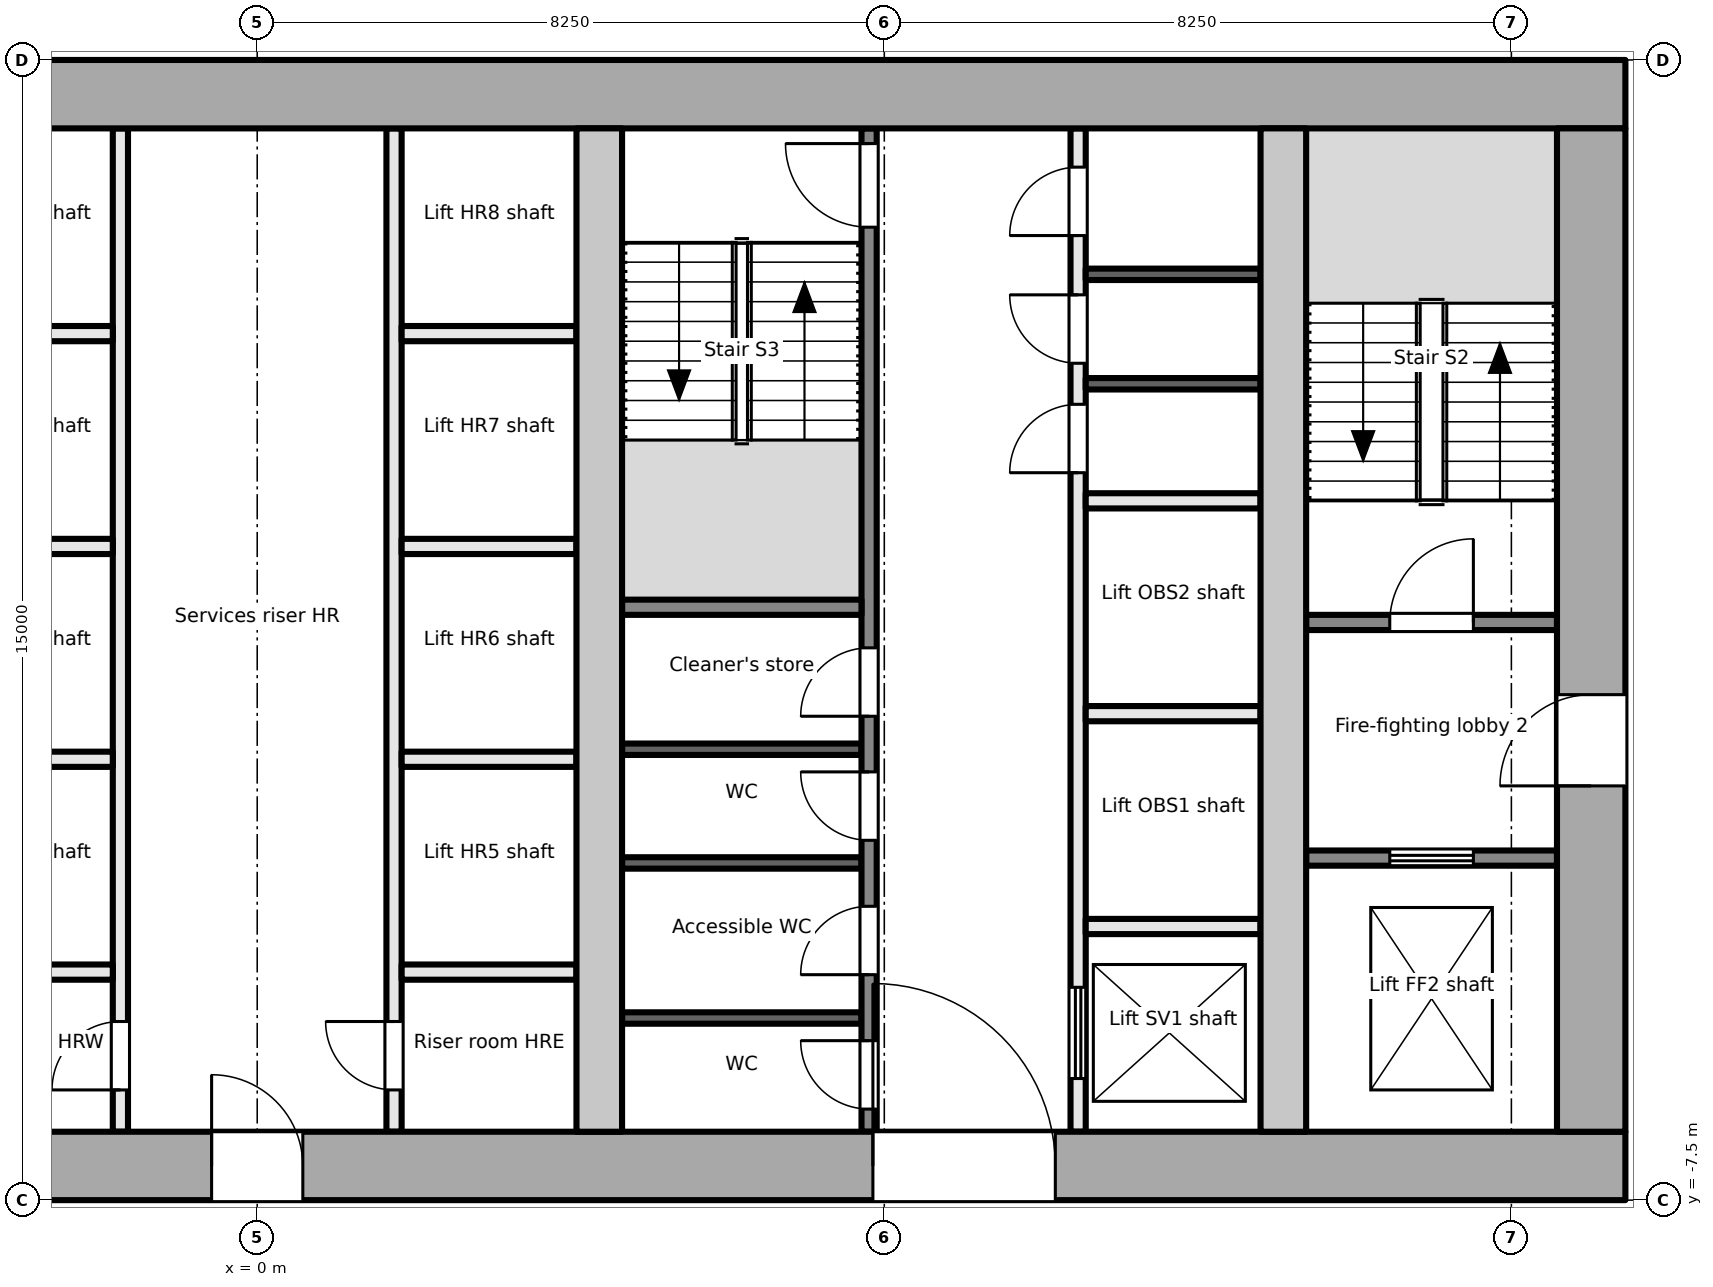
"""IFC4 building model, lengths in metres.
Left out: names, types, materials, properties, quantities, classifications, styles, units other than length and angle.
Written with IfcOpenShell. Run it as: python <this file> out.ifc"""

import sys

from ifc_helpers import new_model, si_unit, direction, frame, frame_2d, origin, place, context, subcontext, project, spatial, rectangle, extrude, element, fill, save


model = new_model("IFC4")
c1 = context("Model", 3, precision=1e-05, world=origin(), true_north=direction((0.0, 1.0)))
c2 = subcontext(c1, "Body", "Model", "MODEL_VIEW")
j1 = project(units=[si_unit("LENGTHUNIT", "METRE"), si_unit("PLANEANGLEUNIT", "RADIAN")], contexts=[c1])
p1 = place(None, origin())
s1 = spatial("IfcSite", under=j1, at=p1, CompositionType="ELEMENT")
p2 = place(p1, origin())
s2 = spatial("IfcBuilding", under=s1, at=p2, CompositionType="ELEMENT")
p3 = place(p2, frame((0.0, 0.0, 95.7)))
s3 = spatial("IfcBuildingStorey", under=s2, at=p3, CompositionType="ELEMENT", Elevation=95.7)
p4 = place(p3, frame((-18.0, -7.05, -0.2), z_axis=(0.0, 0.0, 1.0), x_axis=(1.0, 0.0, 0.0)))
e1 = element("IfcWall", 1, at=p4, inside=s3, PredefinedType="SHEAR", context=c2, shape_type="SweptSolid", body=[
    extrude(rectangle(XDim=36.0, YDim=0.9, at=frame_2d((18.0, 0.0))), origin(), (0.0, 0.0, 1.0), 4.0),
])
p5 = place(p4, frame((7.8, 0.0, 0.2)))
e2 = element("IfcOpeningElement", 2, at=p5, cuts=e1, PredefinedType="OPENING", context=c2, shape_type="SweptSolid", body=[
    extrude(rectangle(XDim=2.4, YDim=2.1, at=frame_2d((1.2, 1.05))), frame((0.0, 0.46, 0.0), z_axis=(0.0, -1.0, 0.0), x_axis=(1.0, 0.0, 0.0)), (0.0, 0.0, 1.0), 0.921),
])
p6 = place(p4, frame((17.4, 0.0, 0.2)))
e3 = element("IfcOpeningElement", 3, at=p6, cuts=e1, PredefinedType="OPENING", context=c2, shape_type="SweptSolid", body=[
    extrude(rectangle(XDim=1.2, YDim=2.1, at=frame_2d((0.6, 1.05))), frame((0.0, 0.46, 0.0), z_axis=(0.0, -1.0, 0.0), x_axis=(1.0, 0.0, 0.0)), (0.0, 0.0, 1.0), 0.921),
])
p7 = place(p4, frame((26.1, 0.0, 0.2)))
e4 = element("IfcOpeningElement", 4, at=p7, cuts=e1, PredefinedType="OPENING", context=c2, shape_type="SweptSolid", body=[
    extrude(rectangle(XDim=2.4, YDim=2.1, at=frame_2d((1.2, 1.05))), frame((0.0, 0.46, 0.0), z_axis=(0.0, -1.0, 0.0), x_axis=(1.0, 0.0, 0.0)), (0.0, 0.0, 1.0), 0.921),
])
p8 = place(p3, frame((-18.0, 7.05, -0.2), z_axis=(0.0, 0.0, 1.0), x_axis=(1.0, 0.0, 0.0)))
e5 = element("IfcWall", 5, at=p8, inside=s3, PredefinedType="SHEAR", context=c2, shape_type="SweptSolid", body=[
    extrude(rectangle(XDim=36.0, YDim=0.9, at=frame_2d((18.0, 0.0))), origin(), (0.0, 0.0, 1.0), 4.0),
])
p9 = place(p3, frame((17.55, -6.6, -0.2), z_axis=(0.0, 0.0, 1.0), x_axis=(0.0, 1.0, 0.0)))
e6 = element("IfcWall", 6, at=p9, inside=s3, PredefinedType="SHEAR", context=c2, shape_type="SweptSolid", body=[
    extrude(rectangle(XDim=13.2, YDim=0.9, at=frame_2d((6.6, 0.0))), origin(), (0.0, 0.0, 1.0), 4.0),
])
p10 = place(p9, frame((4.55, 0.0, 0.2)))
e7 = element("IfcOpeningElement", 7, at=p10, cuts=e6, PredefinedType="OPENING", context=c2, shape_type="SweptSolid", body=[
    extrude(rectangle(XDim=1.2, YDim=2.1, at=frame_2d((0.6, 1.05))), frame((0.0, 0.46, 0.0), z_axis=(0.0, -1.0, 0.0), x_axis=(1.0, 0.0, 0.0)), (0.0, 0.0, 1.0), 0.921),
])
for number, where, z_axis, x_axis in (
    (8, (4.5, -6.6, -0.2), (0.0, 0.0, 1.0), (0.0, 1.0, 0.0)),
    (9, (13.5, -6.6, -0.2), (0.0, 0.0, 1.0), (0.0, 1.0, 0.0)),
):
    element("IfcWall", number, at=place(p3, frame(where, z_axis=z_axis, x_axis=x_axis)), inside=s3, PredefinedType="SHEAR", context=c2, shape_type="SweptSolid", body=[
        extrude(rectangle(XDim=13.2, YDim=0.6, at=frame_2d((6.6, 0.0))), origin(), (0.0, 0.0, 1.0), 4.0),
    ])
p11 = place(p3, frame((13.8, -3.0, 0.0), z_axis=(0.0, 0.0, 1.0), x_axis=(1.0, 0.0, 0.0)))
e10 = element("IfcWall", 10, at=p11, inside=s3, PredefinedType="PARTITIONING", context=c2, shape_type="SweptSolid", body=[
    extrude(rectangle(XDim=3.3, YDim=0.2, at=frame_2d((1.65, 0.0))), origin(), (0.0, 0.0, 1.0), 3.8),
])
p12 = place(p11, frame((1.1, 0.0, 0.0)))
e11 = element("IfcOpeningElement", 11, at=p12, cuts=e10, PredefinedType="OPENING", context=c2, shape_type="SweptSolid", body=[
    extrude(rectangle(XDim=1.1, YDim=2.1, at=frame_2d((0.55, 1.05))), frame((0.0, 0.111, 0.0), z_axis=(0.0, -1.0, 0.0), x_axis=(1.0, 0.0, 0.0)), (0.0, 0.0, 1.0), 0.221),
])
p13 = place(p3, frame((13.8, 0.1, 0.0), z_axis=(0.0, 0.0, 1.0), x_axis=(1.0, 0.0, 0.0)))
e12 = element("IfcWall", 12, at=p13, inside=s3, PredefinedType="PARTITIONING", context=c2, shape_type="SweptSolid", body=[
    extrude(rectangle(XDim=3.3, YDim=0.2, at=frame_2d((1.65, 0.0))), origin(), (0.0, 0.0, 1.0), 3.8),
])
p14 = place(p13, frame((1.1, 0.0, 0.0)))
e13 = element("IfcOpeningElement", 13, at=p14, cuts=e12, PredefinedType="OPENING", context=c2, shape_type="SweptSolid", body=[
    extrude(rectangle(XDim=1.1, YDim=2.1, at=frame_2d((0.55, 1.05))), frame((0.0, 0.111, 0.0), z_axis=(0.0, -1.0, 0.0), x_axis=(1.0, 0.0, 0.0)), (0.0, 0.0, 1.0), 0.221),
])
p15 = place(p3, frame((-1.8, -6.6, 0.0), z_axis=(0.0, 0.0, 1.0), x_axis=(0.0, 1.0, 0.0)))
e14 = element("IfcWall", 14, at=p15, inside=s3, PredefinedType="PARTITIONING", context=c2, shape_type="SweptSolid", body=[
    extrude(rectangle(XDim=13.2, YDim=0.2, at=frame_2d((6.6, 0.0))), origin(), (0.0, 0.0, 1.0), 3.8),
])
p16 = place(p15, frame((0.55, 0.0, 0.0)))
e15 = element("IfcOpeningElement", 15, at=p16, cuts=e14, PredefinedType="OPENING", context=c2, shape_type="SweptSolid", body=[
    extrude(rectangle(XDim=0.9, YDim=2.1, at=frame_2d((0.45, 1.05))), frame((0.0, 0.111, 0.0), z_axis=(0.0, -1.0, 0.0), x_axis=(1.0, 0.0, 0.0)), (0.0, 0.0, 1.0), 0.221),
])
p17 = place(p3, frame((1.8, -6.6, 0.0), z_axis=(0.0, 0.0, 1.0), x_axis=(0.0, 1.0, 0.0)))
e16 = element("IfcWall", 16, at=p17, inside=s3, PredefinedType="PARTITIONING", context=c2, shape_type="SweptSolid", body=[
    extrude(rectangle(XDim=13.2, YDim=0.2, at=frame_2d((6.6, 0.0))), origin(), (0.0, 0.0, 1.0), 3.8),
])
p18 = place(p17, frame((0.55, 0.0, 0.0)))
e17 = element("IfcOpeningElement", 17, at=p18, cuts=e16, PredefinedType="OPENING", context=c2, shape_type="SweptSolid", body=[
    extrude(rectangle(XDim=0.9, YDim=2.1, at=frame_2d((0.45, 1.05))), frame((0.0, 0.111, 0.0), z_axis=(0.0, -1.0, 0.0), x_axis=(1.0, 0.0, 0.0)), (0.0, 0.0, 1.0), 0.221),
])
for number, where, z_axis, x_axis in (
    (18, (-4.2, -1.7, 0.0), (0.0, 0.0, 1.0), (1.0, 0.0, 0.0)),
    (19, (-4.2, 1.1, 0.0), (0.0, 0.0, 1.0), (1.0, 0.0, 0.0)),
    (20, (-4.2, 3.9, 0.0), (0.0, 0.0, 1.0), (1.0, 0.0, 0.0)),
    (21, (-4.2, -4.5, 0.0), (0.0, 0.0, 1.0), (1.0, 0.0, 0.0)),
    (22, (1.9, -1.7, 0.0), (0.0, 0.0, 1.0), (1.0, 0.0, 0.0)),
    (23, (1.9, 1.1, 0.0), (0.0, 0.0, 1.0), (1.0, 0.0, 0.0)),
    (24, (1.9, 3.9, 0.0), (0.0, 0.0, 1.0), (1.0, 0.0, 0.0)),
    (25, (1.9, -4.5, 0.0), (0.0, 0.0, 1.0), (1.0, 0.0, 0.0)),
):
    element("IfcWall", number, at=place(p3, frame(where, z_axis=z_axis, x_axis=x_axis)), inside=s3, PredefinedType="PARTITIONING", context=c2, shape_type="SweptSolid", body=[
        extrude(rectangle(XDim=2.3, YDim=0.2, at=frame_2d((1.15, 0.0))), origin(), (0.0, 0.0, 1.0), 3.8),
    ])
p19 = place(p3, frame((8.05, -6.6, 0.0), z_axis=(0.0, 0.0, 1.0), x_axis=(0.0, 1.0, 0.0)))
e26 = element("IfcWall", 26, at=p19, inside=s3, PredefinedType="PARTITIONING", context=c2, shape_type="SweptSolid", body=[
    extrude(rectangle(XDim=13.2, YDim=0.2, at=frame_2d((6.6, 0.0))), origin(), (0.0, 0.0, 1.0), 3.8),
])
p20 = place(p19, frame((0.298, 0.0, 0.0)))
e27 = element("IfcOpeningElement", 27, at=p20, cuts=e26, PredefinedType="OPENING", context=c2, shape_type="SweptSolid", body=[
    extrude(rectangle(XDim=0.9, YDim=2.1, at=frame_2d((0.45, 1.05))), frame((0.0, 0.111, 0.0), z_axis=(0.0, -1.0, 0.0), x_axis=(1.0, 0.0, 0.0)), (0.0, 0.0, 1.0), 0.221),
])
p21 = place(p19, frame((2.066, 0.0, 0.0)))
e28 = element("IfcOpeningElement", 28, at=p21, cuts=e26, PredefinedType="OPENING", context=c2, shape_type="SweptSolid", body=[
    extrude(rectangle(XDim=0.9, YDim=2.1, at=frame_2d((0.45, 1.05))), frame((0.0, 0.111, 0.0), z_axis=(0.0, -1.0, 0.0), x_axis=(1.0, 0.0, 0.0)), (0.0, 0.0, 1.0), 0.221),
])
p22 = place(p19, frame((3.834, 0.0, 0.0)))
e29 = element("IfcOpeningElement", 29, at=p22, cuts=e26, PredefinedType="OPENING", context=c2, shape_type="SweptSolid", body=[
    extrude(rectangle(XDim=0.9, YDim=2.1, at=frame_2d((0.45, 1.05))), frame((0.0, 0.111, 0.0), z_axis=(0.0, -1.0, 0.0), x_axis=(1.0, 0.0, 0.0)), (0.0, 0.0, 1.0), 0.221),
])
p23 = place(p19, frame((5.466, 0.0, 0.0)))
e30 = element("IfcOpeningElement", 30, at=p23, cuts=e26, PredefinedType="OPENING", context=c2, shape_type="SweptSolid", body=[
    extrude(rectangle(XDim=0.9, YDim=2.1, at=frame_2d((0.45, 1.05))), frame((0.0, 0.111, 0.0), z_axis=(0.0, -1.0, 0.0), x_axis=(1.0, 0.0, 0.0)), (0.0, 0.0, 1.0), 0.221),
])
p24 = place(p19, frame((11.9, 0.0, 0.0)))
e31 = element("IfcOpeningElement", 31, at=p24, cuts=e26, PredefinedType="OPENING", context=c2, shape_type="SweptSolid", body=[
    extrude(rectangle(XDim=1.1, YDim=2.1, at=frame_2d((0.55, 1.05))), frame((0.0, 0.111, 0.0), z_axis=(0.0, -1.0, 0.0), x_axis=(1.0, 0.0, 0.0)), (0.0, 0.0, 1.0), 0.221),
])
p25 = place(p3, frame((10.8, -6.6, 0.0), z_axis=(0.0, 0.0, 1.0), x_axis=(0.0, 1.0, 0.0)))
e32 = element("IfcWall", 32, at=p25, inside=s3, PredefinedType="PARTITIONING", context=c2, shape_type="SweptSolid", body=[
    extrude(rectangle(XDim=13.2, YDim=0.2, at=frame_2d((6.6, 0.0))), origin(), (0.0, 0.0, 1.0), 3.8),
])
p26 = place(p25, frame((0.7, 0.0, 0.0)))
e33 = element("IfcOpeningElement", 33, at=p26, cuts=e32, PredefinedType="OPENING", context=c2, shape_type="SweptSolid", body=[
    extrude(rectangle(XDim=1.2, YDim=2.1, at=frame_2d((0.6, 1.05))), frame((0.0, 0.111, 0.0), z_axis=(0.0, -1.0, 0.0), x_axis=(1.0, 0.0, 0.0)), (0.0, 0.0, 1.0), 0.221),
])
p27 = place(p25, frame((8.67, 0.0, 0.0)))
e34 = element("IfcOpeningElement", 34, at=p27, cuts=e32, PredefinedType="OPENING", context=c2, shape_type="SweptSolid", body=[
    extrude(rectangle(XDim=0.9, YDim=2.1, at=frame_2d((0.45, 1.05))), frame((0.0, 0.111, 0.0), z_axis=(0.0, -1.0, 0.0), x_axis=(1.0, 0.0, 0.0)), (0.0, 0.0, 1.0), 0.221),
])
p28 = place(p25, frame((10.11, 0.0, 0.0)))
e35 = element("IfcOpeningElement", 35, at=p28, cuts=e32, PredefinedType="OPENING", context=c2, shape_type="SweptSolid", body=[
    extrude(rectangle(XDim=0.9, YDim=2.1, at=frame_2d((0.45, 1.05))), frame((0.0, 0.111, 0.0), z_axis=(0.0, -1.0, 0.0), x_axis=(1.0, 0.0, 0.0)), (0.0, 0.0, 1.0), 0.221),
])
p29 = place(p25, frame((11.79, 0.0, 0.0)))
e36 = element("IfcOpeningElement", 36, at=p29, cuts=e32, PredefinedType="OPENING", context=c2, shape_type="SweptSolid", body=[
    extrude(rectangle(XDim=0.9, YDim=2.1, at=frame_2d((0.45, 1.05))), frame((0.0, 0.111, 0.0), z_axis=(0.0, -1.0, 0.0), x_axis=(1.0, 0.0, 0.0)), (0.0, 0.0, 1.0), 0.221),
])
p30 = place(p3, frame((4.8, 0.3, 0.0), z_axis=(0.0, 0.0, 1.0), x_axis=(1.0, 0.0, 0.0)))
e37 = element("IfcWall", 37, at=p30, inside=s3, PredefinedType="PARTITIONING", context=c2, shape_type="SweptSolid", body=[
    extrude(rectangle(XDim=3.15, YDim=0.2, at=frame_2d((1.575, 0.0))), origin(), (0.0, 0.0, 1.0), 3.8),
])
for number, where, z_axis, x_axis in (
    (38, (4.8, -5.104, 0.0), (0.0, 0.0, 1.0), (1.0, 0.0, 0.0)),
    (39, (4.8, -3.064, 0.0), (0.0, 0.0, 1.0), (1.0, 0.0, 0.0)),
    (40, (4.8, -1.568, 0.0), (0.0, 0.0, 1.0), (1.0, 0.0, 0.0)),
):
    element("IfcWall", number, at=place(p3, frame(where, z_axis=z_axis, x_axis=x_axis)), inside=s3, PredefinedType="PARTITIONING", context=c2, shape_type="SweptSolid", body=[
        extrude(rectangle(XDim=3.15, YDim=0.15, at=frame_2d((1.575, 0.0))), origin(), (0.0, 0.0, 1.0), 3.8),
    ])
for number, where, z_axis, x_axis in (
    (41, (10.9, -3.9, 0.0), (0.0, 0.0, 1.0), (1.0, 0.0, 0.0)),
    (42, (10.9, -1.1, 0.0), (0.0, 0.0, 1.0), (1.0, 0.0, 0.0)),
    (43, (10.9, 1.7, 0.0), (0.0, 0.0, 1.0), (1.0, 0.0, 0.0)),
):
    element("IfcWall", number, at=place(p3, frame(where, z_axis=z_axis, x_axis=x_axis)), inside=s3, PredefinedType="PARTITIONING", context=c2, shape_type="SweptSolid", body=[
        extrude(rectangle(XDim=2.3, YDim=0.2, at=frame_2d((1.15, 0.0))), origin(), (0.0, 0.0, 1.0), 3.8),
    ])
for number, where, z_axis, x_axis in (
    (44, (10.9, 3.24, 0.0), (0.0, 0.0, 1.0), (1.0, 0.0, 0.0)),
    (45, (10.9, 4.68, 0.0), (0.0, 0.0, 1.0), (1.0, 0.0, 0.0)),
):
    element("IfcWall", number, at=place(p3, frame(where, z_axis=z_axis, x_axis=x_axis)), inside=s3, PredefinedType="PARTITIONING", context=c2, shape_type="SweptSolid", body=[
        extrude(rectangle(XDim=2.3, YDim=0.15, at=frame_2d((1.15, 0.0))), origin(), (0.0, 0.0, 1.0), 3.8),
    ])
p31 = place(p12, origin())
e46 = element("IfcDoor", 46, at=p31, inside=s3, OperationType="DOUBLE_DOOR_SLIDING", PredefinedType="DOOR", context=c2, shape_type="SweptSolid", body=[
    extrude(rectangle(XDim=1.1, YDim=2.1, at=frame_2d((0.55, 1.05))), frame((0.0, 0.025, 0.0), z_axis=(0.0, -1.0, 0.0), x_axis=(1.0, 0.0, 0.0)), (0.0, 0.0, 1.0), 0.05),
])
fill(e11, e46)
p32 = place(p10, origin())
e47 = element("IfcDoor", 47, at=p32, inside=s3, OperationType="SINGLE_SWING_LEFT", PredefinedType="DOOR", context=c2, shape_type="SweptSolid", body=[
    extrude(rectangle(XDim=1.2, YDim=2.1, at=frame_2d((0.6, 1.05))), frame((0.0, 0.025, 0.0), z_axis=(0.0, -1.0, 0.0), x_axis=(1.0, 0.0, 0.0)), (0.0, 0.0, 1.0), 0.05),
])
fill(e7, e47)
p33 = place(p14, origin())
e48 = element("IfcDoor", 48, at=p33, inside=s3, OperationType="SINGLE_SWING_RIGHT", PredefinedType="DOOR", context=c2, shape_type="SweptSolid", body=[
    extrude(rectangle(XDim=1.1, YDim=2.1, at=frame_2d((0.55, 1.05))), frame((0.0, 0.025, 0.0), z_axis=(0.0, -1.0, 0.0), x_axis=(1.0, 0.0, 0.0)), (0.0, 0.0, 1.0), 0.05),
])
fill(e13, e48)
p34 = place(p16, origin())
e49 = element("IfcDoor", 49, at=p34, inside=s3, OperationType="SINGLE_SWING_LEFT", PredefinedType="DOOR", context=c2, shape_type="SweptSolid", body=[
    extrude(rectangle(XDim=0.9, YDim=2.1, at=frame_2d((0.45, 1.05))), frame((0.0, 0.025, 0.0), z_axis=(0.0, -1.0, 0.0), x_axis=(1.0, 0.0, 0.0)), (0.0, 0.0, 1.0), 0.05),
])
fill(e15, e49)
p35 = place(p18, origin())
e50 = element("IfcDoor", 50, at=p35, inside=s3, OperationType="SINGLE_SWING_RIGHT", PredefinedType="DOOR", context=c2, shape_type="SweptSolid", body=[
    extrude(rectangle(XDim=0.9, YDim=2.1, at=frame_2d((0.45, 1.05))), frame((0.0, 0.025, 0.0), z_axis=(0.0, -1.0, 0.0), x_axis=(1.0, 0.0, 0.0)), (0.0, 0.0, 1.0), 0.05),
])
fill(e17, e50)
p36 = place(p6, origin())
e51 = element("IfcDoor", 51, at=p36, inside=s3, OperationType="SINGLE_SWING_LEFT", PredefinedType="DOOR", context=c2, shape_type="SweptSolid", body=[
    extrude(rectangle(XDim=1.2, YDim=2.1, at=frame_2d((0.6, 1.05))), frame((0.0, 0.025, 0.0), z_axis=(0.0, -1.0, 0.0), x_axis=(1.0, 0.0, 0.0)), (0.0, 0.0, 1.0), 0.05),
])
fill(e3, e51)
p37 = place(p20, origin())
e52 = element("IfcDoor", 52, at=p37, inside=s3, OperationType="SINGLE_SWING_RIGHT", PredefinedType="DOOR", context=c2, shape_type="SweptSolid", body=[
    extrude(rectangle(XDim=0.9, YDim=2.1, at=frame_2d((0.45, 1.05))), frame((0.0, 0.025, 0.0), z_axis=(0.0, -1.0, 0.0), x_axis=(1.0, 0.0, 0.0)), (0.0, 0.0, 1.0), 0.05),
])
fill(e27, e52)
p38 = place(p21, origin())
e53 = element("IfcDoor", 53, at=p38, inside=s3, OperationType="SINGLE_SWING_LEFT", PredefinedType="DOOR", context=c2, shape_type="SweptSolid", body=[
    extrude(rectangle(XDim=0.9, YDim=2.1, at=frame_2d((0.45, 1.05))), frame((0.0, 0.025, 0.0), z_axis=(0.0, -1.0, 0.0), x_axis=(1.0, 0.0, 0.0)), (0.0, 0.0, 1.0), 0.05),
])
fill(e28, e53)
p39 = place(p22, origin())
e54 = element("IfcDoor", 54, at=p39, inside=s3, OperationType="SINGLE_SWING_RIGHT", PredefinedType="DOOR", context=c2, shape_type="SweptSolid", body=[
    extrude(rectangle(XDim=0.9, YDim=2.1, at=frame_2d((0.45, 1.05))), frame((0.0, 0.025, 0.0), z_axis=(0.0, -1.0, 0.0), x_axis=(1.0, 0.0, 0.0)), (0.0, 0.0, 1.0), 0.05),
])
fill(e29, e54)
p40 = place(p23, origin())
e55 = element("IfcDoor", 55, at=p40, inside=s3, OperationType="SINGLE_SWING_LEFT", PredefinedType="DOOR", context=c2, shape_type="SweptSolid", body=[
    extrude(rectangle(XDim=0.9, YDim=2.1, at=frame_2d((0.45, 1.05))), frame((0.0, 0.025, 0.0), z_axis=(0.0, -1.0, 0.0), x_axis=(1.0, 0.0, 0.0)), (0.0, 0.0, 1.0), 0.05),
])
fill(e30, e55)
p41 = place(p24, origin())
e56 = element("IfcDoor", 56, at=p41, inside=s3, OperationType="SINGLE_SWING_RIGHT", PredefinedType="DOOR", context=c2, shape_type="SweptSolid", body=[
    extrude(rectangle(XDim=1.1, YDim=2.1, at=frame_2d((0.55, 1.05))), frame((0.0, 0.025, 0.0), z_axis=(0.0, -1.0, 0.0), x_axis=(1.0, 0.0, 0.0)), (0.0, 0.0, 1.0), 0.05),
])
fill(e31, e56)
p42 = place(p7, origin())
e57 = element("IfcDoor", 57, at=p42, inside=s3, OperationType="DOUBLE_DOOR_DOUBLE_SWING", PredefinedType="DOOR", context=c2, shape_type="SweptSolid", body=[
    extrude(rectangle(XDim=2.4, YDim=2.1, at=frame_2d((1.2, 1.05))), frame((0.0, 0.025, 0.0), z_axis=(0.0, -1.0, 0.0), x_axis=(1.0, 0.0, 0.0)), (0.0, 0.0, 1.0), 0.05),
])
fill(e4, e57)
p43 = place(p26, origin())
e58 = element("IfcDoor", 58, at=p43, inside=s3, OperationType="DOUBLE_DOOR_SLIDING", PredefinedType="DOOR", context=c2, shape_type="SweptSolid", body=[
    extrude(rectangle(XDim=1.2, YDim=2.1, at=frame_2d((0.6, 1.05))), frame((0.0, 0.025, 0.0), z_axis=(0.0, -1.0, 0.0), x_axis=(1.0, 0.0, 0.0)), (0.0, 0.0, 1.0), 0.05),
])
fill(e33, e58)
p44 = place(p27, origin())
e59 = element("IfcDoor", 59, at=p44, inside=s3, OperationType="SINGLE_SWING_LEFT", PredefinedType="DOOR", context=c2, shape_type="SweptSolid", body=[
    extrude(rectangle(XDim=0.9, YDim=2.1, at=frame_2d((0.45, 1.05))), frame((0.0, 0.025, 0.0), z_axis=(0.0, -1.0, 0.0), x_axis=(1.0, 0.0, 0.0)), (0.0, 0.0, 1.0), 0.05),
])
fill(e34, e59)
p45 = place(p28, origin())
e60 = element("IfcDoor", 60, at=p45, inside=s3, OperationType="SINGLE_SWING_RIGHT", PredefinedType="DOOR", context=c2, shape_type="SweptSolid", body=[
    extrude(rectangle(XDim=0.9, YDim=2.1, at=frame_2d((0.45, 1.05))), frame((0.0, 0.025, 0.0), z_axis=(0.0, -1.0, 0.0), x_axis=(1.0, 0.0, 0.0)), (0.0, 0.0, 1.0), 0.05),
])
fill(e35, e60)
p46 = place(p29, origin())
e61 = element("IfcDoor", 61, at=p46, inside=s3, OperationType="SINGLE_SWING_LEFT", PredefinedType="DOOR", context=c2, shape_type="SweptSolid", body=[
    extrude(rectangle(XDim=0.9, YDim=2.1, at=frame_2d((0.45, 1.05))), frame((0.0, 0.025, 0.0), z_axis=(0.0, -1.0, 0.0), x_axis=(1.0, 0.0, 0.0)), (0.0, 0.0, 1.0), 0.05),
])
fill(e36, e61)
save(model, sys.argv[1])
